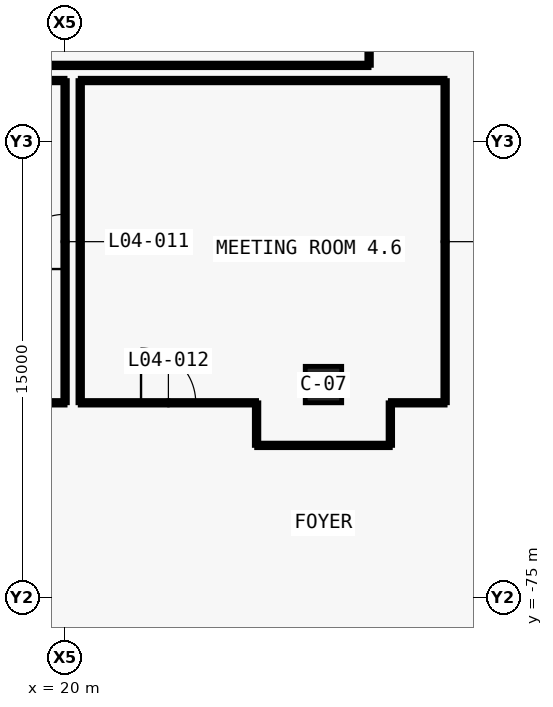
"""IFC4 building model, lengths in metres.
Left out: names, types, materials, properties, quantities, classifications, styles, units other than length and angle.
Written with IfcOpenShell. Run it as: python <this file> out.ifc"""

import sys

from ifc_helpers import new_model, si_unit, direction, frame, frame_2d, origin, origin_2d, place, context, subcontext, project, spatial, rectangle, extrude, element, fill, save


model = new_model("IFC4")
c1 = context("Model", 3, precision=1e-05, world=origin(), true_north=direction((0.0, 1.0)))
c2 = subcontext(c1, "Body", "Model", "MODEL_VIEW")
j1 = project(units=[si_unit("LENGTHUNIT", "METRE"), si_unit("PLANEANGLEUNIT", "RADIAN")], contexts=[c1])
p1 = place(None, origin())
s1 = spatial("IfcSite", under=j1, at=p1, CompositionType="ELEMENT")
p2 = place(p1, origin())
s2 = spatial("IfcBuilding", under=s1, at=p2, CompositionType="ELEMENT")
p3 = place(p2, frame((0.0, 0.0, 32.0)))
s3 = spatial("IfcBuildingStorey", under=s2, at=p3, CompositionType="ELEMENT", Elevation=32.0)
p4 = place(p3, frame((28.5, -68.0, 0.0), z_axis=(0.0, 0.0, 1.0), x_axis=(1.0, 0.0, 0.0)))
e1 = element("IfcColumn", 1, at=p4, inside=s3, PredefinedType="COLUMN", context=c2, shape_type="SweptSolid", body=[
    extrude(rectangle(XDim=1.2, YDim=1.2, at=origin_2d()), origin(), (0.0, 0.0, 1.0), 5.5),
])
p5 = place(p3, frame((20.001, -68.599, 0.0), z_axis=(0.0, 0.0, 1.0), x_axis=(0.0, 1.0, 0.0)))
e2 = element("IfcWall", 2, at=p5, inside=s3, PredefinedType="PARTITIONING", context=c2, shape_type="SweptSolid", body=[
    extrude(rectangle(XDim=10.599, YDim=0.15, at=frame_2d((5.3, 0.0))), origin(), (0.0, 0.0, 1.0), 4.28),
])
p6 = place(p5, frame((4.399, 0.0, 0.0)))
e3 = element("IfcOpeningElement", 3, at=p6, cuts=e2, PredefinedType="OPENING", context=c2, shape_type="SweptSolid", body=[
    extrude(rectangle(XDim=1.8, YDim=2.4, at=frame_2d((0.9, 1.2))), frame((0.0, 0.085, 0.0), z_axis=(0.0, -1.0, 0.0), x_axis=(1.0, 0.0, 0.0)), (0.0, 0.0, 1.0), 0.17),
])
p7 = place(p3, frame((20.0, -57.999, 0.0), z_axis=(0.0, 0.0, 1.0), x_axis=(-1.0, 0.0, 0.0)))
e4 = element("IfcWall", 4, at=p7, inside=s3, PredefinedType="PARTITIONING", context=c2, shape_type="SweptSolid", body=[
    extrude(rectangle(XDim=12.0, YDim=0.15, at=frame_2d((6.0, 0.0))), origin(), (0.0, 0.0, 1.0), 4.28),
])
p8 = place(p3, frame((32.501, -68.599, 0.0), z_axis=(0.0, 0.0, 1.0), x_axis=(0.0, 1.0, 0.0)))
e5 = element("IfcWall", 5, at=p8, inside=s3, PredefinedType="PARTITIONING", context=c2, shape_type="SweptSolid", body=[
    extrude(rectangle(XDim=10.599, YDim=0.15, at=frame_2d((5.3, 0.0))), origin(), (0.0, 0.0, 1.0), 4.28),
])
p9 = place(p3, frame((32.5, -57.999, 0.0), z_axis=(0.0, 0.0, 1.0), x_axis=(-1.0, 0.0, 0.0)))
e6 = element("IfcWall", 6, at=p9, inside=s3, PredefinedType="PARTITIONING", context=c2, shape_type="SweptSolid", body=[
    extrude(rectangle(XDim=12.0, YDim=0.15, at=frame_2d((6.0, 0.0))), origin(), (0.0, 0.0, 1.0), 4.28),
])
p10 = place(p3, frame((20.499, -58.0, 0.0), z_axis=(0.0, 0.0, 1.0), x_axis=(0.0, -1.0, 0.0)))
e7 = element("IfcWall", 7, at=p10, inside=s3, PredefinedType="PARTITIONING", context=c2, shape_type="SweptSolid", body=[
    extrude(rectangle(XDim=10.599, YDim=0.15, at=frame_2d((5.3, 0.0))), origin(), (0.0, 0.0, 1.0), 4.28),
])
p11 = place(p3, frame((7.0, -57.501, 0.0), z_axis=(0.0, 0.0, 1.0), x_axis=(1.0, 0.0, 0.0)))
e8 = element("IfcWall", 8, at=p11, inside=s3, PredefinedType="PARTITIONING", context=c2, shape_type="SweptSolid", body=[
    extrude(rectangle(XDim=23.0, YDim=0.15, at=frame_2d((11.5, 0.0))), origin(), (0.0, 0.0, 1.0), 4.28),
])
p12 = place(p11, frame((10.9, 0.0, 0.0)))
e9 = element("IfcOpeningElement", 9, at=p12, cuts=e8, PredefinedType="OPENING", context=c2, shape_type="SweptSolid", body=[
    extrude(rectangle(XDim=1.2, YDim=2.4, at=frame_2d((0.6, 1.2))), frame((0.0, 0.085, 0.0), z_axis=(0.0, -1.0, 0.0), x_axis=(1.0, 0.0, 0.0)), (0.0, 0.0, 1.0), 0.17),
])
p13 = place(p3, frame((30.001, -57.5, 0.0), z_axis=(0.0, 0.0, 1.0), x_axis=(0.0, 1.0, 0.0)))
e10 = element("IfcWall", 10, at=p13, inside=s3, PredefinedType="PARTITIONING", context=c2, shape_type="SweptSolid", body=[
    extrude(rectangle(XDim=11.5, YDim=0.15, at=frame_2d((5.75, 0.0))), origin(), (0.0, 0.0, 1.0), 4.28),
])
p14 = place(p3, frame((26.301, -70.001, 0.0), z_axis=(0.0, 0.0, 1.0), x_axis=(1.0, 0.0, 0.0)))
e11 = element("IfcWall", 11, at=p14, inside=s3, PredefinedType="PARTITIONING", context=c2, shape_type="SweptSolid", body=[
    extrude(rectangle(XDim=4.398, YDim=0.15, at=frame_2d((2.199, 0.0))), origin(), (0.0, 0.0, 1.0), 4.28),
])
p15 = place(p3, frame((10.12, -68.6, 0.0), z_axis=(0.0, 0.0, 1.0), x_axis=(1.0, 0.0, 0.0)))
e12 = element("IfcWall", 12, at=p15, inside=s3, PredefinedType="PARTITIONING", context=c2, shape_type="SweptSolid", body=[
    extrude(rectangle(XDim=9.882, YDim=0.15, at=frame_2d((4.941, 0.0))), origin(), (0.0, 0.0, 1.0), 5.1),
])
p16 = place(p3, frame((20.498, -68.6, 0.0), z_axis=(0.0, 0.0, 1.0), x_axis=(1.0, 0.0, 0.0)))
e13 = element("IfcWall", 13, at=p16, inside=s3, PredefinedType="PARTITIONING", context=c2, shape_type="SweptSolid", body=[
    extrude(rectangle(XDim=5.802, YDim=0.15, at=frame_2d((2.901, 0.0))), origin(), (0.0, 0.0, 1.0), 5.1),
])
p17 = place(p16, frame((2.001, 0.0, 0.0)))
e14 = element("IfcOpeningElement", 14, at=p17, cuts=e13, PredefinedType="OPENING", context=c2, shape_type="SweptSolid", body=[
    extrude(rectangle(XDim=1.8, YDim=2.4, at=frame_2d((0.9, 1.2))), frame((0.0, 0.085, 0.0), z_axis=(0.0, -1.0, 0.0), x_axis=(1.0, 0.0, 0.0)), (0.0, 0.0, 1.0), 0.17),
])
for number, where, z_axis, x_axis in (
    (15, (26.3, -68.6, 0.0), (0.0, 0.0, 1.0), (0.0, -1.0, 0.0)),
    (16, (30.7, -70.002, 0.0), (0.0, 0.0, 1.0), (0.0, 1.0, 0.0)),
):
    element("IfcWall", number, at=place(p3, frame(where, z_axis=z_axis, x_axis=x_axis)), inside=s3, PredefinedType="PARTITIONING", context=c2, shape_type="SweptSolid", body=[
        extrude(rectangle(XDim=1.402, YDim=0.15, at=frame_2d((0.701, 0.0))), origin(), (0.0, 0.0, 1.0), 5.1),
    ])
p18 = place(p3, frame((30.7, -68.6, 0.0), z_axis=(0.0, 0.0, 1.0), x_axis=(1.0, 0.0, 0.0)))
e17 = element("IfcWall", 17, at=p18, inside=s3, PredefinedType="PARTITIONING", context=c2, shape_type="SweptSolid", body=[
    extrude(rectangle(XDim=1.802, YDim=0.15, at=frame_2d((0.901, 0.0))), origin(), (0.0, 0.0, 1.0), 5.1),
])
p19 = place(p6, origin())
e18 = element("IfcDoor", 18, at=p19, inside=s3, OperationType="DOUBLE_DOOR_SINGLE_SWING", PredefinedType="DOOR", context=c2, shape_type="SweptSolid", body=[
    extrude(rectangle(XDim=1.8, YDim=2.4, at=frame_2d((0.9, 1.2))), frame((0.0, 0.025, 0.0), z_axis=(0.0, -1.0, 0.0), x_axis=(1.0, 0.0, 0.0)), (0.0, 0.0, 1.0), 0.05),
])
fill(e3, e18)
p20 = place(p17, origin())
e19 = element("IfcDoor", 19, at=p20, inside=s3, OperationType="DOUBLE_DOOR_SINGLE_SWING", PredefinedType="DOOR", context=c2, shape_type="SweptSolid", body=[
    extrude(rectangle(XDim=1.8, YDim=2.4, at=frame_2d((0.9, 1.2))), frame((0.0, 0.025, 0.0), z_axis=(0.0, -1.0, 0.0), x_axis=(1.0, 0.0, 0.0)), (0.0, 0.0, 1.0), 0.05),
])
fill(e14, e19)
save(model, sys.argv[1])
